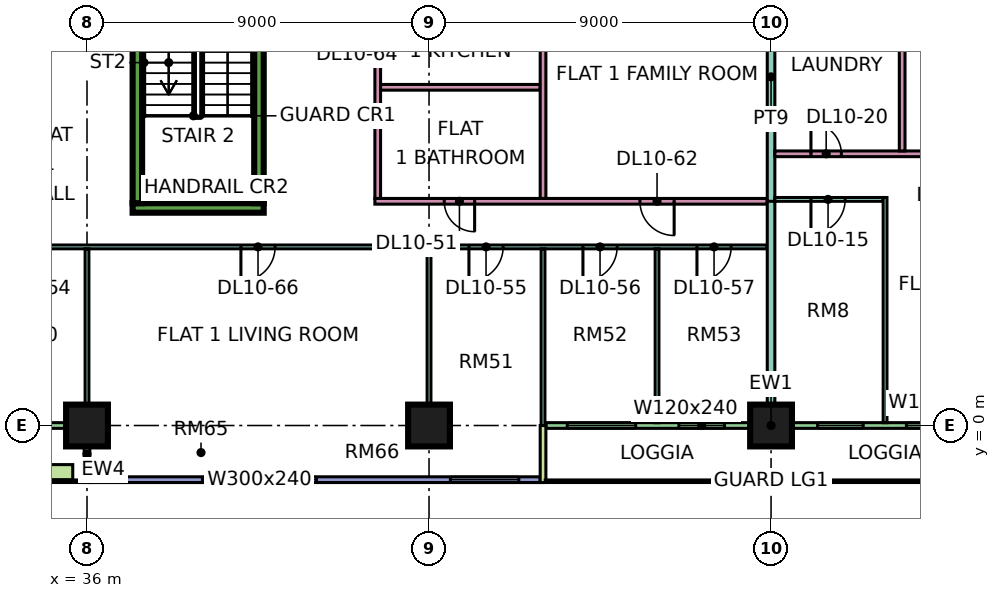
"""IFC4 building model, lengths in metres.
Left out: names, types, materials, properties, quantities, classifications, styles, units other than length and angle.
Written with IfcOpenShell. Run it as: python <this file> out.ifc"""

import sys

from ifc_helpers import new_model, si_unit, direction, frame, frame_2d, origin, origin_2d, place, context, subcontext, project, spatial, rectangle, extrude, element, fill, save


model = new_model("IFC4")
c1 = context("Model", 3, precision=1e-05, world=origin(), true_north=direction((0.0, 1.0)))
c2 = subcontext(c1, "Body", "Model", "MODEL_VIEW")
j1 = project(units=[si_unit("LENGTHUNIT", "METRE"), si_unit("PLANEANGLEUNIT", "RADIAN")], contexts=[c1])
p1 = place(None, origin())
s1 = spatial("IfcSite", under=j1, at=p1, CompositionType="ELEMENT")
p2 = place(p1, origin())
s2 = spatial("IfcBuilding", under=s1, at=p2, CompositionType="ELEMENT")
p3 = place(p2, frame((0.0, 0.0, 52.65)))
s3 = spatial("IfcBuildingStorey", under=s2, at=p3, CompositionType="ELEMENT", Elevation=52.65)
for number, where, z_axis, x_axis in (
    (1, (36.0, 0.0, 0.0), (0.0, 0.0, 1.0), (1.0, 0.0, 0.0)),
    (2, (45.0, 0.0, 0.0), (0.0, 0.0, 1.0), (1.0, 0.0, 0.0)),
    (3, (54.0, 0.0, 0.0), (0.0, 0.0, 1.0), (1.0, 0.0, 0.0)),
):
    element("IfcColumn", number, at=place(p3, frame(where, z_axis=z_axis, x_axis=x_axis)), inside=s3, PredefinedType="COLUMN", context=c2, shape_type="SweptSolid", body=[
        extrude(rectangle(XDim=1.1, YDim=1.1, at=origin_2d()), origin(), (0.0, 0.0, 1.0), 3.75),
    ])
p4 = place(p3, frame((37.2, 5.725, 0.0), z_axis=(0.0, 0.0, 1.0), x_axis=(1.0, 0.0, 0.0)))
e4 = element("IfcWall", 4, at=p4, inside=s3, PredefinedType="SHEAR", context=c2, shape_type="SweptSolid", body=[
    extrude(rectangle(XDim=3.45, YDim=0.25, at=frame_2d((1.725, 0.0))), origin(), (0.0, 0.0, 1.0), 3.75),
])
for number, where, z_axis, x_axis in (
    (5, (37.325, 5.85, 0.0), (0.0, 0.0, 1.0), (0.0, 1.0, 0.0)),
    (6, (40.525, 5.85, 0.0), (0.0, 0.0, 1.0), (0.0, 1.0, 0.0)),
):
    element("IfcWall", number, at=place(p3, frame(where, z_axis=z_axis, x_axis=x_axis)), inside=s3, PredefinedType="SHEAR", context=c2, shape_type="SweptSolid", body=[
        extrude(rectangle(XDim=6.5, YDim=0.25, at=frame_2d((3.25, 0.0))), origin(), (0.0, 0.0, 1.0), 3.75),
    ])
p5 = place(p3, frame((24.075, 0.0, 0.0), z_axis=(0.0, 0.0, 1.0), x_axis=(1.0, 0.0, 0.0)))
e7 = element("IfcWall", 7, at=p5, inside=s3, PredefinedType="SOLIDWALL", context=c2, shape_type="SweptSolid", body=[
    extrude(rectangle(XDim=11.85, YDim=0.15, at=frame_2d((5.925, 0.0))), origin(), (0.0, 0.0, 1.0), 3.35),
])
p6 = place(p5, frame((2.35, 0.0, 0.0)))
e8 = element("IfcOpeningElement", 8, at=p6, cuts=e7, PredefinedType="OPENING", context=c2, shape_type="SweptSolid", body=[
    extrude(rectangle(XDim=1.8, YDim=2.4, at=frame_2d((0.9, 1.2))), frame((0.0, 0.085, 0.0), z_axis=(0.0, -1.0, 0.0), x_axis=(1.0, 0.0, 0.0)), (0.0, 0.0, 1.0), 0.17),
])
p7 = place(p5, frame((6.525, 0.0, 0.45)))
e9 = element("IfcOpeningElement", 9, at=p7, cuts=e7, PredefinedType="OPENING", context=c2, shape_type="SweptSolid", body=[
    extrude(rectangle(XDim=1.8, YDim=2.4, at=frame_2d((0.9, 1.2))), frame((0.0, 0.085, 0.0), z_axis=(0.0, -1.0, 0.0), x_axis=(1.0, 0.0, 0.0)), (0.0, 0.0, 1.0), 0.17),
])
p8 = place(p5, frame((9.5, 0.0, 0.45)))
e10 = element("IfcOpeningElement", 10, at=p8, cuts=e7, PredefinedType="OPENING", context=c2, shape_type="SweptSolid", body=[
    extrude(rectangle(XDim=1.2, YDim=2.4, at=frame_2d((0.6, 1.2))), frame((0.0, 0.085, 0.0), z_axis=(0.0, -1.0, 0.0), x_axis=(1.0, 0.0, 0.0)), (0.0, 0.0, 1.0), 0.17),
])
p9 = place(p3, frame((36.0, -1.5, 0.0), z_axis=(0.0, 0.0, 1.0), x_axis=(0.0, 1.0, 0.0)))
e11 = element("IfcWall", 11, at=p9, inside=s3, PredefinedType="SOLIDWALL", context=c2, shape_type="SweptSolid", body=[
    extrude(rectangle(XDim=1.5, YDim=0.15, at=frame_2d((0.75, 0.0))), origin(), (0.0, 0.0, 1.0), 3.35),
])
p10 = place(p3, frame((36.075, -1.425, 0.0), z_axis=(0.0, 0.0, 1.0), x_axis=(1.0, 0.0, 0.0)))
e12 = element("IfcWall", 12, at=p10, inside=s3, PredefinedType="SOLIDWALL", context=c2, shape_type="SweptSolid", body=[
    extrude(rectangle(XDim=11.85, YDim=0.15, at=frame_2d((5.925, 0.0))), origin(), (0.0, 0.0, 1.0), 3.35),
])
p11 = place(p10, frame((2.962, 0.0, 0.45)))
e13 = element("IfcOpeningElement", 13, at=p11, cuts=e12, PredefinedType="OPENING", context=c2, shape_type="SweptSolid", body=[
    extrude(rectangle(XDim=3.0, YDim=2.4, at=frame_2d((1.5, 1.2))), frame((0.0, 0.085, 0.0), z_axis=(0.0, -1.0, 0.0), x_axis=(1.0, 0.0, 0.0)), (0.0, 0.0, 1.0), 0.17),
])
p12 = place(p10, frame((9.488, 0.0, 0.45)))
e14 = element("IfcOpeningElement", 14, at=p12, cuts=e12, PredefinedType="OPENING", context=c2, shape_type="SweptSolid", body=[
    extrude(rectangle(XDim=1.8, YDim=2.4, at=frame_2d((0.9, 1.2))), frame((0.0, 0.085, 0.0), z_axis=(0.0, -1.0, 0.0), x_axis=(1.0, 0.0, 0.0)), (0.0, 0.0, 1.0), 0.17),
])
p13 = place(p3, frame((48.075, 0.0, 0.0), z_axis=(0.0, 0.0, 1.0), x_axis=(1.0, 0.0, 0.0)))
e15 = element("IfcWall", 15, at=p13, inside=s3, PredefinedType="SOLIDWALL", context=c2, shape_type="SweptSolid", body=[
    extrude(rectangle(XDim=11.85, YDim=0.15, at=frame_2d((5.925, 0.0))), origin(), (0.0, 0.0, 1.0), 3.35),
])
p14 = place(p13, frame((0.562, 0.0, 0.45)))
e16 = element("IfcOpeningElement", 16, at=p14, cuts=e15, PredefinedType="OPENING", context=c2, shape_type="SweptSolid", body=[
    extrude(rectangle(XDim=1.8, YDim=2.4, at=frame_2d((0.9, 1.2))), frame((0.0, 0.085, 0.0), z_axis=(0.0, -1.0, 0.0), x_axis=(1.0, 0.0, 0.0)), (0.0, 0.0, 1.0), 0.17),
])
p15 = place(p13, frame((3.5, 0.0, 0.45)))
e17 = element("IfcOpeningElement", 17, at=p15, cuts=e15, PredefinedType="OPENING", context=c2, shape_type="SweptSolid", body=[
    extrude(rectangle(XDim=1.2, YDim=2.4, at=frame_2d((0.6, 1.2))), frame((0.0, 0.085, 0.0), z_axis=(0.0, -1.0, 0.0), x_axis=(1.0, 0.0, 0.0)), (0.0, 0.0, 1.0), 0.17),
])
p16 = place(p13, frame((7.15, 0.0, 0.45)))
e18 = element("IfcOpeningElement", 18, at=p16, cuts=e15, PredefinedType="OPENING", context=c2, shape_type="SweptSolid", body=[
    extrude(rectangle(XDim=1.2, YDim=2.4, at=frame_2d((0.6, 1.2))), frame((0.0, 0.085, 0.0), z_axis=(0.0, -1.0, 0.0), x_axis=(1.0, 0.0, 0.0)), (0.0, 0.0, 1.0), 0.17),
])
p17 = place(p13, frame((9.488, 0.0, 0.45)))
e19 = element("IfcOpeningElement", 19, at=p17, cuts=e15, PredefinedType="OPENING", context=c2, shape_type="SweptSolid", body=[
    extrude(rectangle(XDim=1.8, YDim=2.4, at=frame_2d((0.9, 1.2))), frame((0.0, 0.085, 0.0), z_axis=(0.0, -1.0, 0.0), x_axis=(1.0, 0.0, 0.0)), (0.0, 0.0, 1.0), 0.17),
])
p18 = place(p3, frame((48.0, -1.5, 0.0), z_axis=(0.0, 0.0, 1.0), x_axis=(0.0, 1.0, 0.0)))
e20 = element("IfcWall", 20, at=p18, inside=s3, PredefinedType="SOLIDWALL", context=c2, shape_type="SweptSolid", body=[
    extrude(rectangle(XDim=1.5, YDim=0.15, at=frame_2d((0.75, 0.0))), origin(), (0.0, 0.0, 1.0), 3.35),
])
p19 = place(p3, frame((24.375, -1.229, 0.0), z_axis=(0.0, 0.0, 1.0), x_axis=(1.0, 0.0, 0.0)))
e21 = element("IfcWall", 21, at=p19, inside=s3, PredefinedType="SOLIDWALL", context=c2, shape_type="SweptSolid", body=[
    extrude(rectangle(XDim=11.25, YDim=0.4, at=frame_2d((5.625, 0.0))), origin(), (0.0, 0.0, 1.0), 0.7),
])
p20 = place(p3, frame((33.05, 4.7, 0.0), z_axis=(0.0, 0.0, 1.0), x_axis=(1.0, 0.0, 0.0)))
e22 = element("IfcWall", 22, at=p20, inside=s3, PredefinedType="PARTITIONING", context=c2, shape_type="SweptSolid", body=[
    extrude(rectangle(XDim=20.85, YDim=0.1, at=frame_2d((10.425, 0.0))), origin(), (0.0, 0.0, 1.0), 3.35),
])
p21 = place(p20, frame((1.0, 0.0, 0.0)))
e23 = element("IfcOpeningElement", 23, at=p21, cuts=e22, PredefinedType="OPENING", context=c2, shape_type="SweptSolid", body=[
    extrude(rectangle(XDim=0.9, YDim=2.1, at=frame_2d((0.45, 1.05))), frame((0.0, 0.06, 0.0), z_axis=(0.0, -1.0, 0.0), x_axis=(1.0, 0.0, 0.0)), (0.0, 0.0, 1.0), 0.12),
])
p22 = place(p20, frame((13.0, 0.0, 0.0)))
e24 = element("IfcOpeningElement", 24, at=p22, cuts=e22, PredefinedType="OPENING", context=c2, shape_type="SweptSolid", body=[
    extrude(rectangle(XDim=0.9, YDim=2.1, at=frame_2d((0.45, 1.05))), frame((0.0, 0.06, 0.0), z_axis=(0.0, -1.0, 0.0), x_axis=(1.0, 0.0, 0.0)), (0.0, 0.0, 1.0), 0.12),
])
p23 = place(p20, frame((16.0, 0.0, 0.0)))
e25 = element("IfcOpeningElement", 25, at=p23, cuts=e22, PredefinedType="OPENING", context=c2, shape_type="SweptSolid", body=[
    extrude(rectangle(XDim=0.9, YDim=2.1, at=frame_2d((0.45, 1.05))), frame((0.0, 0.06, 0.0), z_axis=(0.0, -1.0, 0.0), x_axis=(1.0, 0.0, 0.0)), (0.0, 0.0, 1.0), 0.12),
])
p24 = place(p20, frame((19.0, 0.0, 0.0)))
e26 = element("IfcOpeningElement", 26, at=p24, cuts=e22, PredefinedType="OPENING", context=c2, shape_type="SweptSolid", body=[
    extrude(rectangle(XDim=0.9, YDim=2.1, at=frame_2d((0.45, 1.05))), frame((0.0, 0.06, 0.0), z_axis=(0.0, -1.0, 0.0), x_axis=(1.0, 0.0, 0.0)), (0.0, 0.0, 1.0), 0.12),
])
p25 = place(p20, frame((7.0, 0.0, 0.0)))
e27 = element("IfcOpeningElement", 27, at=p25, cuts=e22, PredefinedType="OPENING", context=c2, shape_type="SweptSolid", body=[
    extrude(rectangle(XDim=0.9, YDim=2.1, at=frame_2d((0.45, 1.05))), frame((0.0, 0.06, 0.0), z_axis=(0.0, -1.0, 0.0), x_axis=(1.0, 0.0, 0.0)), (0.0, 0.0, 1.0), 0.12),
])
p26 = place(p3, frame((36.0, 0.0, 0.0), z_axis=(0.0, 0.0, 1.0), x_axis=(0.0, 1.0, 0.0)))
e28 = element("IfcWall", 28, at=p26, inside=s3, PredefinedType="PARTITIONING", context=c2, shape_type="SweptSolid", body=[
    extrude(rectangle(XDim=4.65, YDim=0.1, at=frame_2d((2.325, 0.0))), origin(), (0.0, 0.0, 1.0), 3.35),
])
p27 = place(p3, frame((43.575, 5.9, 0.0), z_axis=(0.0, 0.0, 1.0), x_axis=(1.0, 0.0, 0.0)))
e29 = element("IfcWall", 29, at=p27, inside=s3, PredefinedType="PARTITIONING", context=c2, shape_type="SweptSolid", body=[
    extrude(rectangle(XDim=10.325, YDim=0.15, at=frame_2d((5.163, 0.0))), origin(), (0.0, 0.0, 1.0), 3.35),
])
p28 = place(p27, frame((1.825, 0.0, 0.0)))
e30 = element("IfcOpeningElement", 30, at=p28, cuts=e29, PredefinedType="OPENING", context=c2, shape_type="SweptSolid", body=[
    extrude(rectangle(XDim=0.8, YDim=2.1, at=frame_2d((0.4, 1.05))), frame((0.0, 0.085, 0.0), z_axis=(0.0, -1.0, 0.0), x_axis=(1.0, 0.0, 0.0)), (0.0, 0.0, 1.0), 0.17),
])
p29 = place(p27, frame((6.975, 0.0, 0.0)))
e31 = element("IfcOpeningElement", 31, at=p29, cuts=e29, PredefinedType="OPENING", context=c2, shape_type="SweptSolid", body=[
    extrude(rectangle(XDim=0.9, YDim=2.1, at=frame_2d((0.45, 1.05))), frame((0.0, 0.085, 0.0), z_axis=(0.0, -1.0, 0.0), x_axis=(1.0, 0.0, 0.0)), (0.0, 0.0, 1.0), 0.17),
])
p30 = place(p3, frame((43.65, 5.975, 0.0), z_axis=(0.0, 0.0, 1.0), x_axis=(0.0, 1.0, 0.0)))
e32 = element("IfcWall", 32, at=p30, inside=s3, PredefinedType="PARTITIONING", context=c2, shape_type="SweptSolid", body=[
    extrude(rectangle(XDim=6.475, YDim=0.15, at=frame_2d((3.237, 0.0))), origin(), (0.0, 0.0, 1.0), 3.35),
])
p31 = place(p30, frame((4.275, 0.0, 0.0)))
e33 = element("IfcOpeningElement", 33, at=p31, cuts=e32, PredefinedType="OPENING", context=c2, shape_type="SweptSolid", body=[
    extrude(rectangle(XDim=0.9, YDim=2.1, at=frame_2d((0.45, 1.05))), frame((0.0, 0.085, 0.0), z_axis=(0.0, -1.0, 0.0), x_axis=(1.0, 0.0, 0.0)), (0.0, 0.0, 1.0), 0.17),
])
p32 = place(p3, frame((43.725, 8.9, 0.0), z_axis=(0.0, 0.0, 1.0), x_axis=(1.0, 0.0, 0.0)))
e34 = element("IfcWall", 34, at=p32, inside=s3, PredefinedType="PARTITIONING", context=c2, shape_type="SweptSolid", body=[
    extrude(rectangle(XDim=4.2, YDim=0.15, at=frame_2d((2.1, 0.0))), origin(), (0.0, 0.0, 1.0), 3.35),
])
for number, where, z_axis, x_axis in (
    (35, (45.0, 0.0, 0.0), (0.0, 0.0, 1.0), (0.0, 1.0, 0.0)),
    (36, (48.0, 0.0, 0.0), (0.0, 0.0, 1.0), (0.0, 1.0, 0.0)),
):
    element("IfcWall", number, at=place(p3, frame(where, z_axis=z_axis, x_axis=x_axis)), inside=s3, PredefinedType="PARTITIONING", context=c2, shape_type="SweptSolid", body=[
        extrude(rectangle(XDim=4.65, YDim=0.1, at=frame_2d((2.325, 0.0))), origin(), (0.0, 0.0, 1.0), 3.35),
    ])
p33 = place(p3, frame((48.0, 5.975, 0.0), z_axis=(0.0, 0.0, 1.0), x_axis=(0.0, 1.0, 0.0)))
e37 = element("IfcWall", 37, at=p33, inside=s3, PredefinedType="PARTITIONING", context=c2, shape_type="SweptSolid", body=[
    extrude(rectangle(XDim=6.475, YDim=0.15, at=frame_2d((3.237, 0.0))), origin(), (0.0, 0.0, 1.0), 3.35),
])
p34 = place(p3, frame((51.0, 0.074, 0.0), z_axis=(0.0, 0.0, 1.0), x_axis=(0.0, 1.0, 0.0)))
e38 = element("IfcWall", 38, at=p34, inside=s3, PredefinedType="PARTITIONING", context=c2, shape_type="SweptSolid", body=[
    extrude(rectangle(XDim=4.576, YDim=0.1, at=frame_2d((2.288, 0.0))), origin(), (0.0, 0.0, 1.0), 3.35),
])
p35 = place(p3, frame((54.0, 0.074, 0.0), z_axis=(0.0, 0.0, 1.0), x_axis=(0.0, 1.0, 0.0)))
e39 = element("IfcWall", 39, at=p35, inside=s3, PredefinedType="PARTITIONING", context=c2, shape_type="SweptSolid", body=[
    extrude(rectangle(XDim=5.901, YDim=0.2, at=frame_2d((2.951, 0.0))), origin(), (0.0, 0.0, 1.0), 3.35),
])
p36 = place(p3, frame((54.0, 5.9, 0.0), z_axis=(0.0, 0.0, 1.0), x_axis=(0.0, 1.0, 0.0)))
e40 = element("IfcWall", 40, at=p36, inside=s3, PredefinedType="PARTITIONING", context=c2, shape_type="SweptSolid", body=[
    extrude(rectangle(XDim=6.55, YDim=0.2, at=frame_2d((3.275, 0.0))), origin(), (0.0, 0.0, 1.0), 3.35),
])
p37 = place(p3, frame((54.1, 5.95, 0.0), z_axis=(0.0, 0.0, 1.0), x_axis=(1.0, 0.0, 0.0)))
e41 = element("IfcWall", 41, at=p37, inside=s3, PredefinedType="PARTITIONING", context=c2, shape_type="SweptSolid", body=[
    extrude(rectangle(XDim=2.85, YDim=0.1, at=frame_2d((1.425, 0.0))), origin(), (0.0, 0.0, 1.0), 3.35),
])
p38 = place(p37, frame((0.95, 0.0, 0.0)))
e42 = element("IfcOpeningElement", 42, at=p38, cuts=e41, PredefinedType="OPENING", context=c2, shape_type="SweptSolid", body=[
    extrude(rectangle(XDim=0.9, YDim=2.1, at=frame_2d((0.45, 1.05))), frame((0.0, 0.06, 0.0), z_axis=(0.0, -1.0, 0.0), x_axis=(1.0, 0.0, 0.0)), (0.0, 0.0, 1.0), 0.12),
])
p39 = place(p3, frame((54.1, 7.15, 0.0), z_axis=(0.0, 0.0, 1.0), x_axis=(1.0, 0.0, 0.0)))
e43 = element("IfcWall", 43, at=p39, inside=s3, PredefinedType="PARTITIONING", context=c2, shape_type="SweptSolid", body=[
    extrude(rectangle(XDim=9.575, YDim=0.15, at=frame_2d((4.788, 0.0))), origin(), (0.0, 0.0, 1.0), 3.35),
])
p40 = place(p39, frame((7.55, 0.0, 0.0)))
e44 = element("IfcOpeningElement", 44, at=p40, cuts=e43, PredefinedType="OPENING", context=c2, shape_type="SweptSolid", body=[
    extrude(rectangle(XDim=0.8, YDim=2.1, at=frame_2d((0.4, 1.05))), frame((0.0, 0.085, 0.0), z_axis=(0.0, -1.0, 0.0), x_axis=(1.0, 0.0, 0.0)), (0.0, 0.0, 1.0), 0.17),
])
p41 = place(p39, frame((0.95, 0.0, 0.0)))
e45 = element("IfcOpeningElement", 45, at=p41, cuts=e43, PredefinedType="OPENING", context=c2, shape_type="SweptSolid", body=[
    extrude(rectangle(XDim=0.8, YDim=2.1, at=frame_2d((0.4, 1.05))), frame((0.0, 0.085, 0.0), z_axis=(0.0, -1.0, 0.0), x_axis=(1.0, 0.0, 0.0)), (0.0, 0.0, 1.0), 0.17),
])
p42 = place(p39, frame((4.4, 0.0, 0.0)))
e46 = element("IfcOpeningElement", 46, at=p42, cuts=e43, PredefinedType="OPENING", context=c2, shape_type="SweptSolid", body=[
    extrude(rectangle(XDim=0.8, YDim=2.1, at=frame_2d((0.4, 1.05))), frame((0.0, 0.085, 0.0), z_axis=(0.0, -1.0, 0.0), x_axis=(1.0, 0.0, 0.0)), (0.0, 0.0, 1.0), 0.17),
])
p43 = place(p3, frame((57.0, 0.074, 0.0), z_axis=(0.0, 0.0, 1.0), x_axis=(0.0, 1.0, 0.0)))
e47 = element("IfcWall", 47, at=p43, inside=s3, PredefinedType="PARTITIONING", context=c2, shape_type="SweptSolid", body=[
    extrude(rectangle(XDim=5.926, YDim=0.1, at=frame_2d((2.963, 0.0))), origin(), (0.0, 0.0, 1.0), 3.35),
])
p44 = place(p3, frame((57.45, 7.225, 0.0), z_axis=(0.0, 0.0, 1.0), x_axis=(0.0, 1.0, 0.0)))
e48 = element("IfcWall", 48, at=p44, inside=s3, PredefinedType="PARTITIONING", context=c2, shape_type="SweptSolid", body=[
    extrude(rectangle(XDim=5.225, YDim=0.15, at=frame_2d((2.612, 0.0))), origin(), (0.0, 0.0, 1.0), 3.35),
])
p45 = place(p11, origin())
e49 = element("IfcWindow", 49, at=p45, inside=s3, PartitioningType="SINGLE_PANEL", PredefinedType="WINDOW", context=c2, shape_type="SweptSolid", body=[
    extrude(rectangle(XDim=3.0, YDim=2.4, at=frame_2d((1.5, 1.2))), frame((0.0, 0.03, 0.0), z_axis=(0.0, -1.0, 0.0), x_axis=(1.0, 0.0, 0.0)), (0.0, 0.0, 1.0), 0.06),
])
fill(e13, e49)
p46 = place(p12, origin())
e50 = element("IfcWindow", 50, at=p46, inside=s3, PartitioningType="SINGLE_PANEL", PredefinedType="WINDOW", context=c2, shape_type="SweptSolid", body=[
    extrude(rectangle(XDim=1.8, YDim=2.4, at=frame_2d((0.9, 1.2))), frame((0.0, 0.03, 0.0), z_axis=(0.0, -1.0, 0.0), x_axis=(1.0, 0.0, 0.0)), (0.0, 0.0, 1.0), 0.06),
])
fill(e14, e50)
p47 = place(p14, origin())
e51 = element("IfcWindow", 51, at=p47, inside=s3, PartitioningType="SINGLE_PANEL", PredefinedType="WINDOW", context=c2, shape_type="SweptSolid", body=[
    extrude(rectangle(XDim=1.8, YDim=2.4, at=frame_2d((0.9, 1.2))), frame((0.0, 0.03, 0.0), z_axis=(0.0, -1.0, 0.0), x_axis=(1.0, 0.0, 0.0)), (0.0, 0.0, 1.0), 0.06),
])
fill(e16, e51)
p48 = place(p15, origin())
e52 = element("IfcWindow", 52, at=p48, inside=s3, PartitioningType="SINGLE_PANEL", PredefinedType="WINDOW", context=c2, shape_type="SweptSolid", body=[
    extrude(rectangle(XDim=1.2, YDim=2.4, at=frame_2d((0.6, 1.2))), frame((0.0, 0.03, 0.0), z_axis=(0.0, -1.0, 0.0), x_axis=(1.0, 0.0, 0.0)), (0.0, 0.0, 1.0), 0.06),
])
fill(e17, e52)
p49 = place(p16, origin())
e53 = element("IfcWindow", 53, at=p49, inside=s3, PartitioningType="SINGLE_PANEL", PredefinedType="WINDOW", context=c2, shape_type="SweptSolid", body=[
    extrude(rectangle(XDim=1.2, YDim=2.4, at=frame_2d((0.6, 1.2))), frame((0.0, 0.03, 0.0), z_axis=(0.0, -1.0, 0.0), x_axis=(1.0, 0.0, 0.0)), (0.0, 0.0, 1.0), 0.06),
])
fill(e18, e53)
p50 = place(p17, origin())
e54 = element("IfcWindow", 54, at=p50, inside=s3, PartitioningType="SINGLE_PANEL", PredefinedType="WINDOW", context=c2, shape_type="SweptSolid", body=[
    extrude(rectangle(XDim=1.8, YDim=2.4, at=frame_2d((0.9, 1.2))), frame((0.0, 0.03, 0.0), z_axis=(0.0, -1.0, 0.0), x_axis=(1.0, 0.0, 0.0)), (0.0, 0.0, 1.0), 0.06),
])
fill(e19, e54)
p51 = place(p38, frame((0.9, 0.0, 0.0), z_axis=(0.0, 0.0, 1.0), x_axis=(-1.0, 0.0, 0.0)))
e55 = element("IfcDoor", 55, at=p51, inside=s3, OperationType="SINGLE_SWING_LEFT", PredefinedType="DOOR", context=c2, shape_type="SweptSolid", body=[
    extrude(rectangle(XDim=0.9, YDim=2.1, at=frame_2d((0.45, 1.05))), frame((0.0, 0.025, 0.0), z_axis=(0.0, -1.0, 0.0), x_axis=(1.0, 0.0, 0.0)), (0.0, 0.0, 1.0), 0.05),
])
fill(e42, e55)
p52 = place(p41, origin())
e56 = element("IfcDoor", 56, at=p52, inside=s3, OperationType="SINGLE_SWING_LEFT", PredefinedType="DOOR", context=c2, shape_type="SweptSolid", body=[
    extrude(rectangle(XDim=0.8, YDim=2.1, at=frame_2d((0.4, 1.05))), frame((0.0, 0.025, 0.0), z_axis=(0.0, -1.0, 0.0), x_axis=(1.0, 0.0, 0.0)), (0.0, 0.0, 1.0), 0.05),
])
fill(e45, e56)
p53 = place(p28, origin())
e57 = element("IfcDoor", 57, at=p53, inside=s3, OperationType="SINGLE_SWING_RIGHT", PredefinedType="DOOR", context=c2, shape_type="SweptSolid", body=[
    extrude(rectangle(XDim=0.8, YDim=2.1, at=frame_2d((0.4, 1.05))), frame((0.0, 0.025, 0.0), z_axis=(0.0, -1.0, 0.0), x_axis=(1.0, 0.0, 0.0)), (0.0, 0.0, 1.0), 0.05),
])
fill(e30, e57)
p54 = place(p22, frame((0.9, 0.0, 0.0), z_axis=(0.0, 0.0, 1.0), x_axis=(-1.0, 0.0, 0.0)))
e58 = element("IfcDoor", 58, at=p54, inside=s3, OperationType="SINGLE_SWING_LEFT", PredefinedType="DOOR", context=c2, shape_type="SweptSolid", body=[
    extrude(rectangle(XDim=0.9, YDim=2.1, at=frame_2d((0.45, 1.05))), frame((0.0, 0.025, 0.0), z_axis=(0.0, -1.0, 0.0), x_axis=(1.0, 0.0, 0.0)), (0.0, 0.0, 1.0), 0.05),
])
fill(e24, e58)
p55 = place(p23, frame((0.9, 0.0, 0.0), z_axis=(0.0, 0.0, 1.0), x_axis=(-1.0, 0.0, 0.0)))
e59 = element("IfcDoor", 59, at=p55, inside=s3, OperationType="SINGLE_SWING_LEFT", PredefinedType="DOOR", context=c2, shape_type="SweptSolid", body=[
    extrude(rectangle(XDim=0.9, YDim=2.1, at=frame_2d((0.45, 1.05))), frame((0.0, 0.025, 0.0), z_axis=(0.0, -1.0, 0.0), x_axis=(1.0, 0.0, 0.0)), (0.0, 0.0, 1.0), 0.05),
])
fill(e25, e59)
p56 = place(p24, frame((0.9, 0.0, 0.0), z_axis=(0.0, 0.0, 1.0), x_axis=(-1.0, 0.0, 0.0)))
e60 = element("IfcDoor", 60, at=p56, inside=s3, OperationType="SINGLE_SWING_LEFT", PredefinedType="DOOR", context=c2, shape_type="SweptSolid", body=[
    extrude(rectangle(XDim=0.9, YDim=2.1, at=frame_2d((0.45, 1.05))), frame((0.0, 0.025, 0.0), z_axis=(0.0, -1.0, 0.0), x_axis=(1.0, 0.0, 0.0)), (0.0, 0.0, 1.0), 0.05),
])
fill(e26, e60)
p57 = place(p29, origin())
e61 = element("IfcDoor", 61, at=p57, inside=s3, OperationType="SINGLE_SWING_RIGHT", PredefinedType="DOOR", context=c2, shape_type="SweptSolid", body=[
    extrude(rectangle(XDim=0.9, YDim=2.1, at=frame_2d((0.45, 1.05))), frame((0.0, 0.025, 0.0), z_axis=(0.0, -1.0, 0.0), x_axis=(1.0, 0.0, 0.0)), (0.0, 0.0, 1.0), 0.05),
])
fill(e31, e61)
p58 = place(p25, frame((0.9, 0.0, 0.0), z_axis=(0.0, 0.0, 1.0), x_axis=(-1.0, 0.0, 0.0)))
e62 = element("IfcDoor", 62, at=p58, inside=s3, OperationType="SINGLE_SWING_LEFT", PredefinedType="DOOR", context=c2, shape_type="SweptSolid", body=[
    extrude(rectangle(XDim=0.9, YDim=2.1, at=frame_2d((0.45, 1.05))), frame((0.0, 0.025, 0.0), z_axis=(0.0, -1.0, 0.0), x_axis=(1.0, 0.0, 0.0)), (0.0, 0.0, 1.0), 0.05),
])
fill(e27, e62)
save(model, sys.argv[1])
